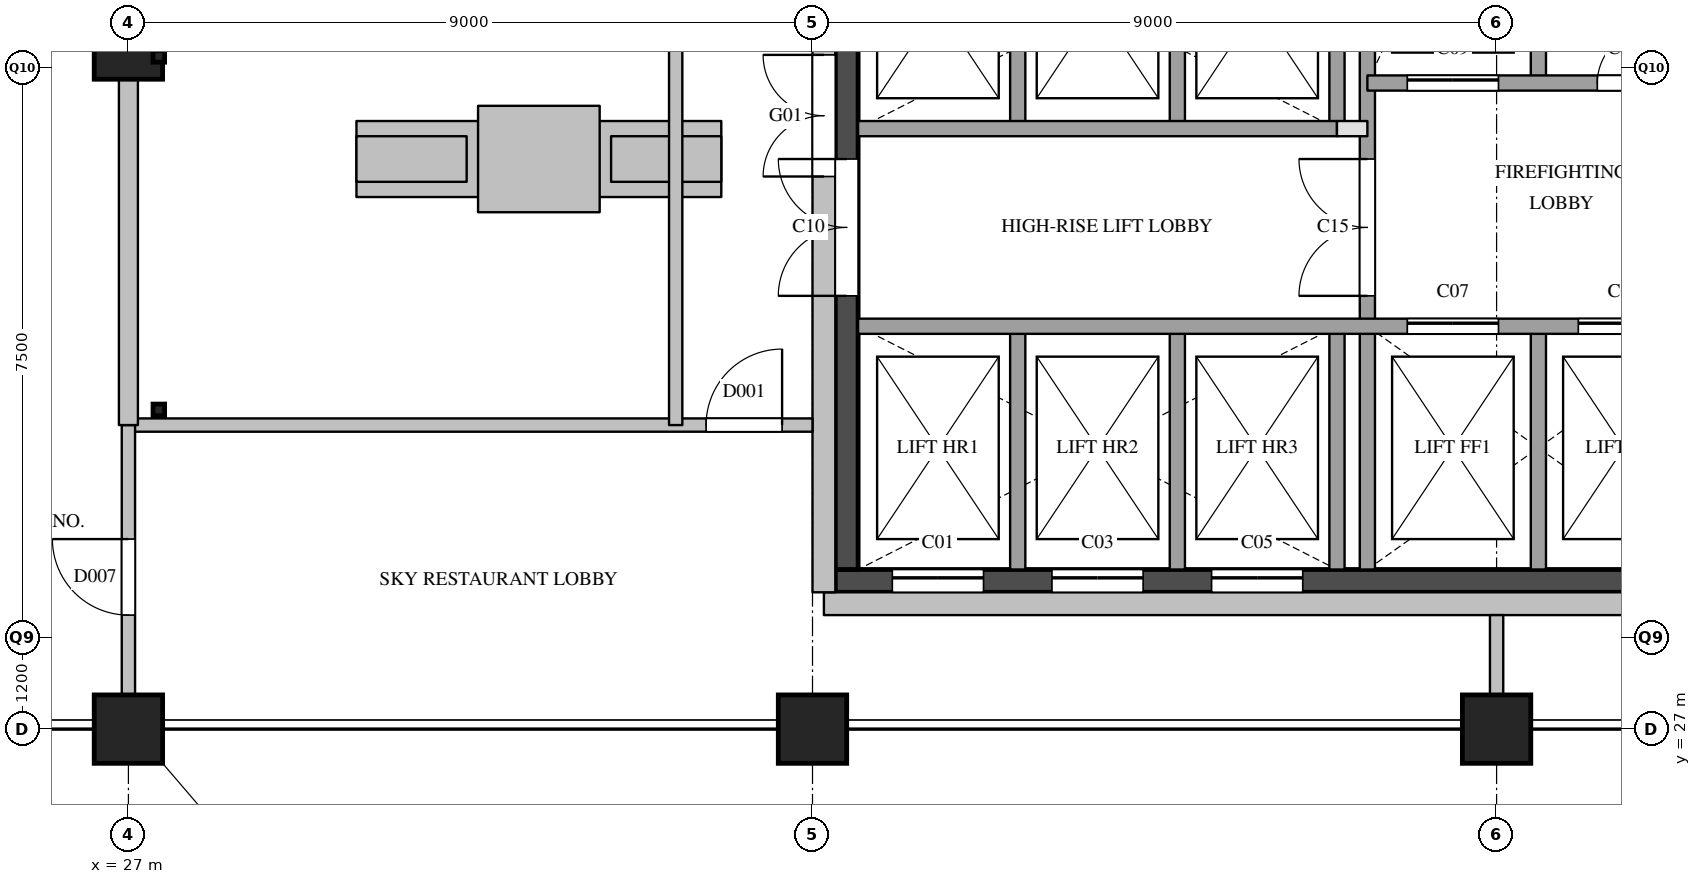
"""IFC4 building model, lengths in metres.
Left out: names, types, materials, properties, quantities, classifications, styles, units other than length and angle.
Written with IfcOpenShell. Run it as: python <this file> out.ifc"""

import sys

from ifc_helpers import new_model, si_unit, direction, frame, frame_2d, origin, origin_2d, place, context, subcontext, project, spatial, rectangle, hollow_rectangle, extrude, element, fill, save


model = new_model("IFC4")
c1 = context("Model", 3, precision=1e-05, world=origin(), true_north=direction((0.0, 1.0)))
c2 = subcontext(c1, "Body", "Model", "MODEL_VIEW")
j1 = project(units=[si_unit("LENGTHUNIT", "METRE"), si_unit("PLANEANGLEUNIT", "RADIAN")], contexts=[c1])
p1 = place(None, origin())
s1 = spatial("IfcSite", under=j1, at=p1, CompositionType="ELEMENT")
p2 = place(p1, origin())
s2 = spatial("IfcBuilding", under=s1, at=p2, CompositionType="ELEMENT")
p3 = place(p2, frame((0.0, 0.0, 320.7)))
s3 = spatial("IfcBuildingStorey", under=s2, at=p3, CompositionType="ELEMENT", Elevation=320.7)
for number, where, z_axis, x_axis in (
    (1, (27.0, 27.0, 0.0), (0.0, 0.0, 1.0), (1.0, 0.0, 0.0)),
    (2, (27.0, 36.0, 0.0), (0.0, 0.0, 1.0), (1.0, 0.0, 0.0)),
    (3, (36.0, 27.0, 0.0), (0.0, 0.0, 1.0), (1.0, 0.0, 0.0)),
    (4, (45.0, 27.0, 0.0), (0.0, 0.0, 1.0), (1.0, 0.0, 0.0)),
):
    element("IfcColumn", number, at=place(p3, frame(where, z_axis=z_axis, x_axis=x_axis)), inside=s3, PredefinedType="COLUMN", context=c2, shape_type="SweptSolid", body=[
        extrude(rectangle(XDim=0.9, YDim=0.9, at=origin_2d()), origin(), (0.0, 0.0, 1.0), 4.5),
    ])
p4 = place(p3, frame((30.0, 34.5, 4.5), z_axis=(0.0, 0.0, 1.0), x_axis=(1.0, 0.0, 0.0)))
e5 = element("IfcWall", 5, at=p4, inside=s3, PredefinedType="SOLIDWALL", context=c2, shape_type="SweptSolid", body=[
    extrude(rectangle(XDim=4.8, YDim=1.0, at=frame_2d((2.4, 0.0))), origin(), (0.0, 0.0, 1.0), 0.75),
])
p5 = place(p3, frame((36.15, 28.65, 4.5), z_axis=(0.0, 0.0, 1.0), x_axis=(1.0, 0.0, 0.0)))
e6 = element("IfcWall", 6, at=p5, inside=s3, PredefinedType="SOLIDWALL", context=c2, shape_type="SweptSolid", body=[
    extrude(rectangle(XDim=12.1, YDim=0.3, at=frame_2d((6.05, 0.0))), origin(), (0.0, 0.0, 1.0), 3.6),
])
p6 = place(p3, frame((36.15, 28.8, 4.5), z_axis=(0.0, 0.0, 1.0), x_axis=(0.0, 1.0, 0.0)))
e7 = element("IfcWall", 7, at=p6, inside=s3, PredefinedType="SOLIDWALL", context=c2, shape_type="SweptSolid", body=[
    extrude(rectangle(XDim=20.9, YDim=0.3, at=frame_2d((10.45, 0.0))), origin(), (0.0, 0.0, 1.0), 3.6),
])
p7 = place(p6, frame((5.47, 0.0, 0.0)))
e8 = element("IfcOpeningElement", 8, at=p7, cuts=e7, PredefinedType="OPENING", context=c2, shape_type="SweptSolid", body=[
    extrude(rectangle(XDim=1.6, YDim=2.4, at=frame_2d((0.8, 1.2))), frame((0.0, 0.16, 0.0), z_axis=(0.0, -1.0, 0.0), x_axis=(1.0, 0.0, 0.0)), (0.0, 0.0, 1.0), 0.32),
])
p8 = place(p6, frame((13.412, 0.0, 0.0)))
e9 = element("IfcOpeningElement", 9, at=p8, cuts=e7, PredefinedType="OPENING", context=c2, shape_type="SweptSolid", body=[
    extrude(rectangle(XDim=1.6, YDim=2.4, at=frame_2d((0.8, 1.2))), frame((0.0, 0.16, 0.0), z_axis=(0.0, -1.0, 0.0), x_axis=(1.0, 0.0, 0.0)), (0.0, 0.0, 1.0), 0.32),
])
for number, where, z_axis, x_axis in (
    (10, (30.0, 34.5, 5.25), (0.0, 0.0, 1.0), (1.0, 0.0, 0.0)),
    (11, (33.35, 34.5, 5.25), (0.0, 0.0, 1.0), (1.0, 0.0, 0.0)),
):
    element("IfcWall", number, at=place(p3, frame(where, z_axis=z_axis, x_axis=x_axis)), inside=s3, PredefinedType="SOLIDWALL", context=c2, shape_type="SweptSolid", body=[
        extrude(rectangle(XDim=1.45, YDim=0.6, at=frame_2d((0.725, 0.0))), origin(), (0.0, 0.0, 1.0), 0.75),
    ])
p9 = place(p3, frame((31.6, 34.5, 5.25), z_axis=(0.0, 0.0, 1.0), x_axis=(1.0, 0.0, 0.0)))
e12 = element("IfcWall", 12, at=p9, inside=s3, PredefinedType="SOLIDWALL", context=c2, shape_type="SweptSolid", body=[
    extrude(rectangle(XDim=1.6, YDim=1.4, at=frame_2d((0.8, 0.0))), origin(), (0.0, 0.0, 1.0), 4.2),
])
for number, where, z_axis, x_axis in (
    (13, (27.4, 31.2, 4.5), (0.0, 0.0, 1.0), (1.0, 0.0, 0.0)),
    (14, (27.4, 35.85, 4.5), (0.0, 0.0, 1.0), (1.0, 0.0, 0.0)),
):
    element("IfcColumn", number, at=place(p3, frame(where, z_axis=z_axis, x_axis=x_axis)), inside=s3, PredefinedType="COLUMN", context=c2, shape_type="SweptSolid", body=[
        extrude(hollow_rectangle(XDim=0.152, YDim=0.152, WallThickness=0.006, at=origin_2d()), origin(), (0.0, 0.0, 1.0), 3.4),
    ])
p10 = place(p3, frame((36.3, 28.95, 0.0), z_axis=(0.0, 0.0, 1.0), x_axis=(1.0, 0.0, 0.0)))
e15 = element("IfcWall", 15, at=p10, inside=s3, PredefinedType="SHEAR", context=c2, shape_type="SweptSolid", body=[
    extrude(rectangle(XDim=11.8, YDim=0.3, at=frame_2d((5.9, 0.0))), origin(), (0.0, 0.0, 1.0), 3.95),
])
p11 = place(p10, frame((0.75, 0.0, 0.0)))
e16 = element("IfcOpeningElement", 16, at=p11, cuts=e15, PredefinedType="OPENING", context=c2, shape_type="SweptSolid", body=[
    extrude(rectangle(XDim=1.2, YDim=2.1, at=frame_2d((0.6, 1.05))), frame((0.0, 0.16, 0.0), z_axis=(0.0, -1.0, 0.0), x_axis=(1.0, 0.0, 0.0)), (0.0, 0.0, 1.0), 0.32),
])
p12 = place(p10, frame((2.85, 0.0, 0.0)))
e17 = element("IfcOpeningElement", 17, at=p12, cuts=e15, PredefinedType="OPENING", context=c2, shape_type="SweptSolid", body=[
    extrude(rectangle(XDim=1.2, YDim=2.1, at=frame_2d((0.6, 1.05))), frame((0.0, 0.16, 0.0), z_axis=(0.0, -1.0, 0.0), x_axis=(1.0, 0.0, 0.0)), (0.0, 0.0, 1.0), 0.32),
])
p13 = place(p10, frame((4.95, 0.0, 0.0)))
e18 = element("IfcOpeningElement", 18, at=p13, cuts=e15, PredefinedType="OPENING", context=c2, shape_type="SweptSolid", body=[
    extrude(rectangle(XDim=1.2, YDim=2.1, at=frame_2d((0.6, 1.05))), frame((0.0, 0.16, 0.0), z_axis=(0.0, -1.0, 0.0), x_axis=(1.0, 0.0, 0.0)), (0.0, 0.0, 1.0), 0.32),
])
p14 = place(p3, frame((36.45, 29.1, 0.0), z_axis=(0.0, 0.0, 1.0), x_axis=(0.0, 1.0, 0.0)))
e19 = element("IfcWall", 19, at=p14, inside=s3, PredefinedType="SHEAR", context=c2, shape_type="SweptSolid", body=[
    extrude(rectangle(XDim=20.3, YDim=0.3, at=frame_2d((10.15, 0.0))), origin(), (0.0, 0.0, 1.0), 3.95),
])
p15 = place(p14, frame((3.6, 0.0, 0.0)))
e20 = element("IfcOpeningElement", 20, at=p15, cuts=e19, PredefinedType="OPENING", context=c2, shape_type="SweptSolid", body=[
    extrude(rectangle(XDim=1.8, YDim=2.1, at=frame_2d((0.9, 1.05))), frame((0.0, 0.16, 0.0), z_axis=(0.0, -1.0, 0.0), x_axis=(1.0, 0.0, 0.0)), (0.0, 0.0, 1.0), 0.32),
])
p16 = place(p14, frame((16.4, 0.0, 0.0)))
e21 = element("IfcOpeningElement", 21, at=p16, cuts=e19, PredefinedType="OPENING", context=c2, shape_type="SweptSolid", body=[
    extrude(rectangle(XDim=1.0, YDim=2.1, at=frame_2d((0.5, 1.05))), frame((0.0, 0.16, 0.0), z_axis=(0.0, -1.0, 0.0), x_axis=(1.0, 0.0, 0.0)), (0.0, 0.0, 1.0), 0.32),
])
p17 = place(p3, frame((38.7, 29.1, 0.0), z_axis=(0.0, 0.0, 1.0), x_axis=(0.0, 1.0, 0.0)))
e22 = element("IfcWall", 22, at=p17, inside=s3, PredefinedType="SOLIDWALL", context=c2, shape_type="SweptSolid", body=[
    extrude(rectangle(XDim=3.2, YDim=0.2, at=frame_2d((1.6, 0.0))), origin(), (0.0, 0.0, 1.0), 3.95),
])
p18 = place(p3, frame((38.7, 34.9, 0.0), z_axis=(0.0, 0.0, 1.0), x_axis=(0.0, 1.0, 0.0)))
e23 = element("IfcWall", 23, at=p18, inside=s3, PredefinedType="SOLIDWALL", context=c2, shape_type="SweptSolid", body=[
    extrude(rectangle(XDim=3.2, YDim=0.2, at=frame_2d((1.6, 0.0))), origin(), (0.0, 0.0, 1.0), 3.95),
])
p19 = place(p3, frame((40.8, 29.1, 0.0), z_axis=(0.0, 0.0, 1.0), x_axis=(0.0, 1.0, 0.0)))
e24 = element("IfcWall", 24, at=p19, inside=s3, PredefinedType="SOLIDWALL", context=c2, shape_type="SweptSolid", body=[
    extrude(rectangle(XDim=3.2, YDim=0.2, at=frame_2d((1.6, 0.0))), origin(), (0.0, 0.0, 1.0), 3.95),
])
p20 = place(p3, frame((40.8, 34.9, 0.0), z_axis=(0.0, 0.0, 1.0), x_axis=(0.0, 1.0, 0.0)))
e25 = element("IfcWall", 25, at=p20, inside=s3, PredefinedType="SOLIDWALL", context=c2, shape_type="SweptSolid", body=[
    extrude(rectangle(XDim=3.2, YDim=0.2, at=frame_2d((1.6, 0.0))), origin(), (0.0, 0.0, 1.0), 3.95),
])
p21 = place(p3, frame((42.9, 29.1, 0.0), z_axis=(0.0, 0.0, 1.0), x_axis=(0.0, 1.0, 0.0)))
e26 = element("IfcWall", 26, at=p21, inside=s3, PredefinedType="SOLIDWALL", context=c2, shape_type="SweptSolid", body=[
    extrude(rectangle(XDim=3.2, YDim=0.2, at=frame_2d((1.6, 0.0))), origin(), (0.0, 0.0, 1.0), 3.95),
])
p22 = place(p3, frame((42.9, 34.9, 0.0), z_axis=(0.0, 0.0, 1.0), x_axis=(0.0, 1.0, 0.0)))
e27 = element("IfcWall", 27, at=p22, inside=s3, PredefinedType="SOLIDWALL", context=c2, shape_type="SweptSolid", body=[
    extrude(rectangle(XDim=3.2, YDim=0.2, at=frame_2d((1.6, 0.0))), origin(), (0.0, 0.0, 1.0), 3.95),
])
p23 = place(p3, frame((43.3, 29.1, 0.0), z_axis=(0.0, 0.0, 1.0), x_axis=(0.0, 1.0, 0.0)))
e28 = element("IfcWall", 28, at=p23, inside=s3, PredefinedType="SOLIDWALL", context=c2, shape_type="SweptSolid", body=[
    extrude(rectangle(XDim=9.9, YDim=0.2, at=frame_2d((4.95, 0.0))), origin(), (0.0, 0.0, 1.0), 3.95),
])
p24 = place(p23, frame((3.6, 0.0, 0.0)))
e29 = element("IfcOpeningElement", 29, at=p24, cuts=e28, PredefinedType="OPENING", context=c2, shape_type="SweptSolid", body=[
    extrude(rectangle(XDim=1.8, YDim=2.1, at=frame_2d((0.9, 1.05))), frame((0.0, 0.11, 0.0), z_axis=(0.0, -1.0, 0.0), x_axis=(1.0, 0.0, 0.0)), (0.0, 0.0, 1.0), 0.22),
])
for number, where, z_axis, x_axis in (
    (30, (45.55, 29.1, 0.0), (0.0, 0.0, 1.0), (0.0, 1.0, 0.0)),
    (31, (45.55, 35.5, 0.0), (0.0, 0.0, 1.0), (0.0, 1.0, 0.0)),
):
    element("IfcWall", number, at=place(p3, frame(where, z_axis=z_axis, x_axis=x_axis)), inside=s3, PredefinedType="SOLIDWALL", context=c2, shape_type="SweptSolid", body=[
        extrude(rectangle(XDim=3.2, YDim=0.2, at=frame_2d((1.6, 0.0))), origin(), (0.0, 0.0, 1.0), 3.95),
    ])
p25 = place(p3, frame((36.6, 32.3, 0.0), z_axis=(0.0, 0.0, 1.0), x_axis=(1.0, 0.0, 0.0)))
e32 = element("IfcWall", 32, at=p25, inside=s3, PredefinedType="SOLIDWALL", context=c2, shape_type="SweptSolid", body=[
    extrude(rectangle(XDim=11.2, YDim=0.2, at=frame_2d((5.6, 0.0))), origin(), (0.0, 0.0, 1.0), 3.95),
])
p26 = place(p25, frame((7.225, 0.0, 0.0)))
e33 = element("IfcOpeningElement", 33, at=p26, cuts=e32, PredefinedType="OPENING", context=c2, shape_type="SweptSolid", body=[
    extrude(rectangle(XDim=1.2, YDim=2.1, at=frame_2d((0.6, 1.05))), frame((0.0, 0.11, 0.0), z_axis=(0.0, -1.0, 0.0), x_axis=(1.0, 0.0, 0.0)), (0.0, 0.0, 1.0), 0.22),
])
p27 = place(p25, frame((9.475, 0.0, 0.0)))
e34 = element("IfcOpeningElement", 34, at=p27, cuts=e32, PredefinedType="OPENING", context=c2, shape_type="SweptSolid", body=[
    extrude(rectangle(XDim=1.2, YDim=2.1, at=frame_2d((0.6, 1.05))), frame((0.0, 0.11, 0.0), z_axis=(0.0, -1.0, 0.0), x_axis=(1.0, 0.0, 0.0)), (0.0, 0.0, 1.0), 0.22),
])
p28 = place(p3, frame((42.9, 34.9, 0.0), z_axis=(0.0, 0.0, 1.0), x_axis=(1.0, 0.0, 0.0)))
e35 = element("IfcWall", 35, at=p28, inside=s3, PredefinedType="PARTITIONING", context=c2, shape_type="SweptSolid", body=[
    extrude(rectangle(XDim=0.4, YDim=0.2, at=frame_2d((0.2, 0.0))), origin(), (0.0, 0.0, 1.0), 3.95),
])
p29 = place(p3, frame((36.6, 34.9, 0.0), z_axis=(0.0, 0.0, 1.0), x_axis=(1.0, 0.0, 0.0)))
e36 = element("IfcWall", 36, at=p29, inside=s3, PredefinedType="SOLIDWALL", context=c2, shape_type="SweptSolid", body=[
    extrude(rectangle(XDim=6.3, YDim=0.2, at=frame_2d((3.15, 0.0))), origin(), (0.0, 0.0, 1.0), 3.95),
])
p30 = place(p3, frame((43.3, 35.5, 0.0), z_axis=(0.0, 0.0, 1.0), x_axis=(1.0, 0.0, 0.0)))
e37 = element("IfcWall", 37, at=p30, inside=s3, PredefinedType="SOLIDWALL", context=c2, shape_type="SweptSolid", body=[
    extrude(rectangle(XDim=4.5, YDim=0.2, at=frame_2d((2.25, 0.0))), origin(), (0.0, 0.0, 1.0), 3.95),
])
p31 = place(p30, frame((0.525, 0.0, 0.0)))
e38 = element("IfcOpeningElement", 38, at=p31, cuts=e37, PredefinedType="OPENING", context=c2, shape_type="SweptSolid", body=[
    extrude(rectangle(XDim=1.2, YDim=2.1, at=frame_2d((0.6, 1.05))), frame((0.0, 0.11, 0.0), z_axis=(0.0, -1.0, 0.0), x_axis=(1.0, 0.0, 0.0)), (0.0, 0.0, 1.0), 0.22),
])
p32 = place(p30, frame((3.025, 0.0, 0.0)))
e39 = element("IfcOpeningElement", 39, at=p32, cuts=e37, PredefinedType="OPENING", context=c2, shape_type="SweptSolid", body=[
    extrude(rectangle(XDim=0.7, YDim=2.1, at=frame_2d((0.35, 1.05))), frame((0.0, 0.11, 0.0), z_axis=(0.0, -1.0, 0.0), x_axis=(1.0, 0.0, 0.0)), (0.0, 0.0, 1.0), 0.22),
])
p33 = place(p3, frame((27.0, 31.0, 0.0), z_axis=(0.0, 0.0, 1.0), x_axis=(1.0, 0.0, 0.0)))
e40 = element("IfcWall", 40, at=p33, inside=s3, PredefinedType="PARTITIONING", context=c2, shape_type="SweptSolid", body=[
    extrude(rectangle(XDim=9.0, YDim=0.175, at=frame_2d((4.5, 0.0))), origin(), (0.0, 0.0, 1.0), 2.95),
])
p34 = place(p33, frame((7.6, 0.0, 0.0)))
e41 = element("IfcOpeningElement", 41, at=p34, cuts=e40, PredefinedType="OPENING", context=c2, shape_type="SweptSolid", body=[
    extrude(rectangle(XDim=1.0, YDim=2.1, at=frame_2d((0.5, 1.05))), frame((0.0, 0.097, 0.0), z_axis=(0.0, -1.0, 0.0), x_axis=(1.0, 0.0, 0.0)), (0.0, 0.0, 1.0), 0.195),
])
p35 = place(p3, frame((27.0, 27.0, 0.0), z_axis=(0.0, 0.0, 1.0), x_axis=(0.0, 1.0, 0.0)))
e42 = element("IfcWall", 42, at=p35, inside=s3, PredefinedType="PARTITIONING", context=c2, shape_type="SweptSolid", body=[
    extrude(rectangle(XDim=4.0, YDim=0.175, at=frame_2d((2.0, 0.0))), origin(), (0.0, 0.0, 1.0), 2.95),
])
p36 = place(p35, frame((1.5, 0.0, 0.0)))
e43 = element("IfcOpeningElement", 43, at=p36, cuts=e42, PredefinedType="OPENING", context=c2, shape_type="SweptSolid", body=[
    extrude(rectangle(XDim=1.0, YDim=2.1, at=frame_2d((0.5, 1.05))), frame((0.0, 0.097, 0.0), z_axis=(0.0, -1.0, 0.0), x_axis=(1.0, 0.0, 0.0)), (0.0, 0.0, 1.0), 0.195),
])
p37 = place(p3, frame((34.2, 31.0, 0.0), z_axis=(0.0, 0.0, 1.0), x_axis=(0.0, 1.0, 0.0)))
e44 = element("IfcWall", 44, at=p37, inside=s3, PredefinedType="PARTITIONING", context=c2, shape_type="SweptSolid", body=[
    extrude(rectangle(XDim=15.8, YDim=0.175, at=frame_2d((7.9, 0.0))), origin(), (0.0, 0.0, 1.0), 3.95),
])
p38 = place(p37, frame((7.4, 0.0, 0.0)))
e45 = element("IfcOpeningElement", 45, at=p38, cuts=e44, PredefinedType="OPENING", context=c2, shape_type="SweptSolid", body=[
    extrude(rectangle(XDim=1.0, YDim=2.1, at=frame_2d((0.5, 1.05))), frame((0.0, 0.097, 0.0), z_axis=(0.0, -1.0, 0.0), x_axis=(1.0, 0.0, 0.0)), (0.0, 0.0, 1.0), 0.195),
])
p39 = place(p3, frame((45.0, 27.0, 0.0), z_axis=(0.0, 0.0, 1.0), x_axis=(0.0, 1.0, 0.0)))
e46 = element("IfcWall", 46, at=p39, inside=s3, PredefinedType="PARTITIONING", context=c2, shape_type="SweptSolid", body=[
    extrude(rectangle(XDim=1.5, YDim=0.175, at=frame_2d((0.75, 0.0))), origin(), (0.0, 0.0, 1.0), 3.95),
])
p40 = place(p3, frame((27.0, 31.0, 0.0), z_axis=(0.0, 0.0, 1.0), x_axis=(0.0, 1.0, 0.0)))
e47 = element("IfcWall", 47, at=p40, inside=s3, PredefinedType="PARTITIONING", context=c2, shape_type="SweptSolid", body=[
    extrude(rectangle(XDim=23.0, YDim=0.25, at=frame_2d((11.5, 0.0))), origin(), (0.0, 0.0, 1.0), 2.95),
])
p41 = place(p7, origin())
e48 = element("IfcDoor", 48, at=p41, inside=s3, OperationType="DOUBLE_DOOR_SINGLE_SWING", PredefinedType="DOOR", context=c2, shape_type="SweptSolid", body=[
    extrude(rectangle(XDim=1.6, YDim=2.4, at=frame_2d((0.8, 1.2))), frame((0.0, 0.025, 0.0), z_axis=(0.0, -1.0, 0.0), x_axis=(1.0, 0.0, 0.0)), (0.0, 0.0, 1.0), 0.05),
])
fill(e8, e48)
p42 = place(p11, origin())
e49 = element("IfcDoor", 49, at=p42, inside=s3, OperationType="SLIDING_TO_LEFT", PredefinedType="DOOR", context=c2, shape_type="SweptSolid", body=[
    extrude(rectangle(XDim=1.2, YDim=2.1, at=frame_2d((0.6, 1.05))), frame((0.0, 0.025, 0.0), z_axis=(0.0, -1.0, 0.0), x_axis=(1.0, 0.0, 0.0)), (0.0, 0.0, 1.0), 0.05),
])
fill(e16, e49)
p43 = place(p12, origin())
e50 = element("IfcDoor", 50, at=p43, inside=s3, OperationType="SLIDING_TO_LEFT", PredefinedType="DOOR", context=c2, shape_type="SweptSolid", body=[
    extrude(rectangle(XDim=1.2, YDim=2.1, at=frame_2d((0.6, 1.05))), frame((0.0, 0.025, 0.0), z_axis=(0.0, -1.0, 0.0), x_axis=(1.0, 0.0, 0.0)), (0.0, 0.0, 1.0), 0.05),
])
fill(e17, e50)
p44 = place(p13, origin())
e51 = element("IfcDoor", 51, at=p44, inside=s3, OperationType="SLIDING_TO_LEFT", PredefinedType="DOOR", context=c2, shape_type="SweptSolid", body=[
    extrude(rectangle(XDim=1.2, YDim=2.1, at=frame_2d((0.6, 1.05))), frame((0.0, 0.025, 0.0), z_axis=(0.0, -1.0, 0.0), x_axis=(1.0, 0.0, 0.0)), (0.0, 0.0, 1.0), 0.05),
])
fill(e18, e51)
p45 = place(p26, origin())
e52 = element("IfcDoor", 52, at=p45, inside=s3, OperationType="SLIDING_TO_LEFT", PredefinedType="DOOR", context=c2, shape_type="SweptSolid", body=[
    extrude(rectangle(XDim=1.2, YDim=2.1, at=frame_2d((0.6, 1.05))), frame((0.0, 0.025, 0.0), z_axis=(0.0, -1.0, 0.0), x_axis=(1.0, 0.0, 0.0)), (0.0, 0.0, 1.0), 0.05),
])
fill(e33, e52)
p46 = place(p27, origin())
e53 = element("IfcDoor", 53, at=p46, inside=s3, OperationType="SLIDING_TO_LEFT", PredefinedType="DOOR", context=c2, shape_type="SweptSolid", body=[
    extrude(rectangle(XDim=1.2, YDim=2.1, at=frame_2d((0.6, 1.05))), frame((0.0, 0.025, 0.0), z_axis=(0.0, -1.0, 0.0), x_axis=(1.0, 0.0, 0.0)), (0.0, 0.0, 1.0), 0.05),
])
fill(e34, e53)
p47 = place(p31, origin())
e54 = element("IfcDoor", 54, at=p47, inside=s3, OperationType="SLIDING_TO_LEFT", PredefinedType="DOOR", context=c2, shape_type="SweptSolid", body=[
    extrude(rectangle(XDim=1.2, YDim=2.1, at=frame_2d((0.6, 1.05))), frame((0.0, 0.025, 0.0), z_axis=(0.0, -1.0, 0.0), x_axis=(1.0, 0.0, 0.0)), (0.0, 0.0, 1.0), 0.05),
])
fill(e38, e54)
p48 = place(p15, origin())
e55 = element("IfcDoor", 55, at=p48, inside=s3, OperationType="DOUBLE_DOOR_SINGLE_SWING", PredefinedType="DOOR", context=c2, shape_type="SweptSolid", body=[
    extrude(rectangle(XDim=1.8, YDim=2.1, at=frame_2d((0.9, 1.05))), frame((0.0, 0.025, 0.0), z_axis=(0.0, -1.0, 0.0), x_axis=(1.0, 0.0, 0.0)), (0.0, 0.0, 1.0), 0.05),
])
fill(e20, e55)
p49 = place(p24, origin())
e56 = element("IfcDoor", 56, at=p49, inside=s3, OperationType="DOUBLE_DOOR_SINGLE_SWING", PredefinedType="DOOR", context=c2, shape_type="SweptSolid", body=[
    extrude(rectangle(XDim=1.8, YDim=2.1, at=frame_2d((0.9, 1.05))), frame((0.0, 0.025, 0.0), z_axis=(0.0, -1.0, 0.0), x_axis=(1.0, 0.0, 0.0)), (0.0, 0.0, 1.0), 0.05),
])
fill(e29, e56)
p50 = place(p32, origin())
e57 = element("IfcDoor", 57, at=p50, inside=s3, OperationType="SINGLE_SWING_RIGHT", PredefinedType="DOOR", context=c2, shape_type="SweptSolid", body=[
    extrude(rectangle(XDim=0.7, YDim=2.1, at=frame_2d((0.35, 1.05))), frame((0.0, 0.025, 0.0), z_axis=(0.0, -1.0, 0.0), x_axis=(1.0, 0.0, 0.0)), (0.0, 0.0, 1.0), 0.05),
])
fill(e39, e57)
p51 = place(p34, origin())
e58 = element("IfcDoor", 58, at=p51, inside=s3, OperationType="SINGLE_SWING_RIGHT", PredefinedType="DOOR", context=c2, shape_type="SweptSolid", body=[
    extrude(rectangle(XDim=1.0, YDim=2.1, at=frame_2d((0.5, 1.05))), frame((0.0, 0.025, 0.0), z_axis=(0.0, -1.0, 0.0), x_axis=(1.0, 0.0, 0.0)), (0.0, 0.0, 1.0), 0.05),
])
fill(e41, e58)
p52 = place(p36, origin())
e59 = element("IfcDoor", 59, at=p52, inside=s3, OperationType="SINGLE_SWING_RIGHT", PredefinedType="DOOR", context=c2, shape_type="SweptSolid", body=[
    extrude(rectangle(XDim=1.0, YDim=2.1, at=frame_2d((0.5, 1.05))), frame((0.0, 0.025, 0.0), z_axis=(0.0, -1.0, 0.0), x_axis=(1.0, 0.0, 0.0)), (0.0, 0.0, 1.0), 0.05),
])
fill(e43, e59)
save(model, sys.argv[1])
